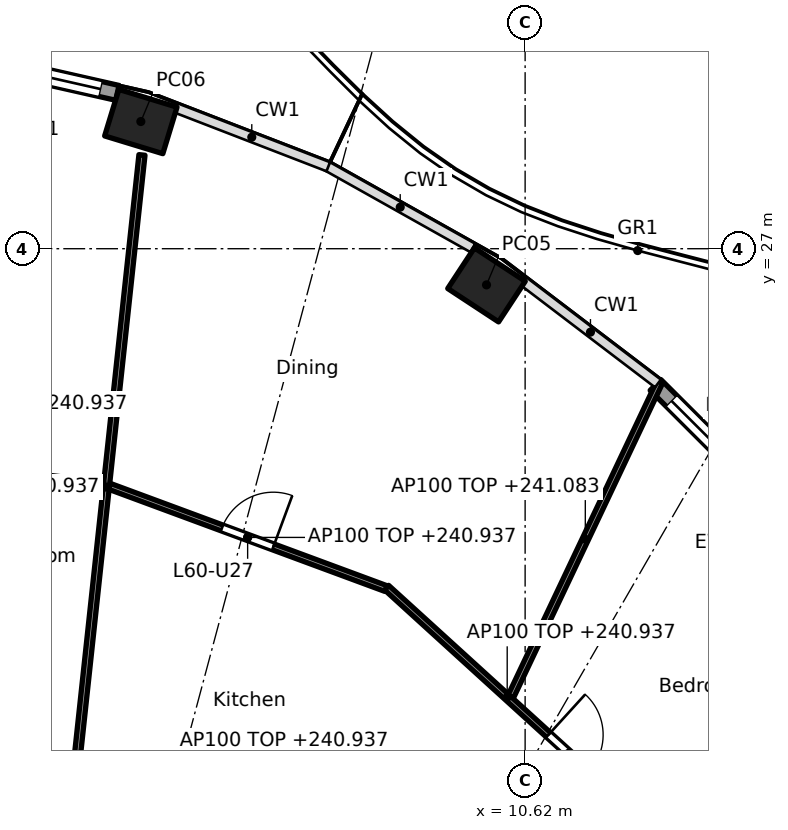
"""IFC4 building model, lengths in metres.
Left out: names, types, materials, properties, quantities, classifications, styles, units other than length and angle.
Written with IfcOpenShell. Run it as: python <this file> out.ifc"""

import sys

from ifc_helpers import new_model, si_unit, direction, frame, frame_2d, origin, origin_2d, place, context, subcontext, project, spatial, rectangle, hollow_rectangle, extrude, element, fill, save


model = new_model("IFC4")
c1 = context("Model", 3, precision=1e-05, world=origin(), true_north=direction((0.0, 1.0)))
c2 = subcontext(c1, "Body", "Model", "MODEL_VIEW")
j1 = project(units=[si_unit("LENGTHUNIT", "METRE"), si_unit("PLANEANGLEUNIT", "RADIAN")], contexts=[c1])
p1 = place(None, origin())
s1 = spatial("IfcSite", under=j1, at=p1, CompositionType="ELEMENT")
p2 = place(p1, origin())
s2 = spatial("IfcBuilding", under=s1, at=p2, CompositionType="ELEMENT")
p3 = place(p2, frame((0.0, 0.0, 238.1)))
s3 = spatial("IfcBuildingStorey", under=s2, at=p3, CompositionType="ELEMENT", Elevation=238.1)
for number, where, z_axis, x_axis in (
    (1, (9.985, 26.405, 0.0), (0.0, 0.0, 1.0), (-0.836, 0.549, 0.0)),
    (2, (4.3, 29.092, 0.0), (0.0, 0.0, 1.0), (-0.957, 0.292, 0.0)),
):
    element("IfcColumn", number, at=place(p3, frame(where, z_axis=z_axis, x_axis=x_axis)), inside=s3, PredefinedType="COLUMN", context=c2, shape_type="SweptSolid", body=[
        extrude(hollow_rectangle(XDim=1.0, YDim=0.8, WallThickness=0.032, at=origin_2d()), origin(), (0.0, 0.0, 1.0), 3.7),
    ])
p4 = place(p3, frame((12.765, 24.759, 0.0), z_axis=(0.0, 0.0, 1.0), x_axis=(0.707793125551, -0.706419769983, 0.0)))
e3 = element("IfcWall", 3, at=p4, inside=s3, PredefinedType="SOLIDWALL", context=c2, shape_type="SweptSolid", body=[
    extrude(rectangle(XDim=2.844, YDim=0.25, at=frame_2d((1.422, 0.0))), origin(), (0.0, 0.0, 1.0), 3.44),
])
p5 = place(p4, frame((0.372, 0.0, 0.0)))
e4 = element("IfcOpeningElement", 4, at=p5, cuts=e3, PredefinedType="OPENING", context=c2, shape_type="SweptSolid", body=[
    extrude(rectangle(XDim=2.1, YDim=2.4, at=frame_2d((1.05, 1.2))), frame((0.0, 0.135, 0.0), z_axis=(0.0, -1.0, 0.0), x_axis=(1.0, 0.0, 0.0)), (0.0, 0.0, 1.0), 0.27),
])
p6 = place(p3, frame((1.314, 30.151, 0.0), z_axis=(0.0, 0.0, 1.0), x_axis=(0.975324089124, -0.220777990694, 0.0)))
e5 = element("IfcWall", 5, at=p6, inside=s3, PredefinedType="SOLIDWALL", context=c2, shape_type="SweptSolid", body=[
    extrude(rectangle(XDim=2.666, YDim=0.25, at=frame_2d((1.333, 0.0))), origin(), (0.0, 0.0, 1.0), 3.44),
])
p7 = place(p6, frame((0.283, 0.0, 0.0)))
e6 = element("IfcOpeningElement", 6, at=p7, cuts=e5, PredefinedType="OPENING", context=c2, shape_type="SweptSolid", body=[
    extrude(rectangle(XDim=2.1, YDim=2.4, at=frame_2d((1.05, 1.2))), frame((0.0, 0.135, 0.0), z_axis=(0.0, -1.0, 0.0), x_axis=(1.0, 0.0, 0.0)), (0.0, 0.0, 1.0), 0.27),
])
p8 = place(p3, frame((12.31, 17.817, 0.0), z_axis=(0.0, 0.0, 1.0), x_axis=(-0.739697052892, 0.672940019573, 0.0)))
e7 = element("IfcWall", 7, at=p8, inside=s3, PredefinedType="PARTITIONING", context=c2, shape_type="SweptSolid", body=[
    extrude(rectangle(XDim=5.365, YDim=0.1, at=frame_2d((2.683, 0.0))), origin(), (0.0, 0.0, 1.0), 2.837),
])
p9 = place(p8, frame((0.866, 0.0, 0.0)))
e8 = element("IfcOpeningElement", 8, at=p9, cuts=e7, PredefinedType="OPENING", context=c2, shape_type="SweptSolid", body=[
    extrude(rectangle(XDim=0.9, YDim=2.1, at=frame_2d((0.45, 1.05))), frame((0.0, 0.06, 0.0), z_axis=(0.0, -1.0, 0.0), x_axis=(1.0, 0.0, 0.0)), (0.0, 0.0, 1.0), 0.12),
])
p10 = place(p3, frame((10.384, 19.634, 0.0), z_axis=(0.0, 0.0, 1.0), x_axis=(0.428003913038, 0.903776880886, 0.0)))
e9 = element("IfcWall", 9, at=p10, inside=s3, PredefinedType="PARTITIONING", context=c2, shape_type="SweptSolid", body=[
    extrude(rectangle(XDim=5.729, YDim=0.1, at=frame_2d((2.865, 0.0))), origin(), (0.0, 0.0, 1.0), 2.983),
])
p11 = place(p3, frame((8.331, 21.411, 0.0), z_axis=(0.0, 0.0, 1.0), x_axis=(-0.937891982431, 0.346927412136, 0.0)))
e10 = element("IfcWall", 10, at=p11, inside=s3, PredefinedType="PARTITIONING", context=c2, shape_type="SweptSolid", body=[
    extrude(rectangle(XDim=4.85, YDim=0.1, at=frame_2d((2.425, 0.0))), origin(), (0.0, 0.0, 1.0), 2.837),
])
p12 = place(p11, frame((1.975, 0.0, 0.0)))
e11 = element("IfcOpeningElement", 11, at=p12, cuts=e10, PredefinedType="OPENING", context=c2, shape_type="SweptSolid", body=[
    extrude(rectangle(XDim=0.9, YDim=2.1, at=frame_2d((0.45, 1.05))), frame((0.0, 0.06, 0.0), z_axis=(0.0, -1.0, 0.0), x_axis=(1.0, 0.0, 0.0)), (0.0, 0.0, 1.0), 0.12),
])
p13 = place(p3, frame((3.145, 17.618, 0.0), z_axis=(0.0, 0.0, 1.0), x_axis=(0.106818720076, 0.994278512813, 0.0)))
e12 = element("IfcWall", 12, at=p13, inside=s3, PredefinedType="PARTITIONING", context=c2, shape_type="SweptSolid", body=[
    extrude(rectangle(XDim=10.987, YDim=0.1, at=frame_2d((5.493, 0.0))), origin(), (0.0, 0.0, 1.0), 2.837),
])
p14 = place(p3, frame((3.686, 23.117, 0.0), z_axis=(0.0, 0.0, 1.0), x_axis=(-0.992965872314, 0.11840091393, 0.0)))
e13 = element("IfcWall", 13, at=p14, inside=s3, PredefinedType="PARTITIONING", context=c2, shape_type="SweptSolid", body=[
    extrude(rectangle(XDim=4.786, YDim=0.1, at=frame_2d((2.393, 0.0))), origin(), (0.0, 0.0, 1.0), 2.837),
])
p15 = place(p5, origin())
e14 = element("IfcDoor", 14, at=p15, inside=s3, OperationType="SLIDING_TO_LEFT", PredefinedType="DOOR", context=c2, shape_type="SweptSolid", body=[
    extrude(rectangle(XDim=2.1, YDim=2.4, at=frame_2d((1.05, 1.2))), frame((0.0, 0.025, 0.0), z_axis=(0.0, -1.0, 0.0), x_axis=(1.0, 0.0, 0.0)), (0.0, 0.0, 1.0), 0.05),
])
fill(e4, e14)
p16 = place(p7, origin())
e15 = element("IfcDoor", 15, at=p16, inside=s3, OperationType="SLIDING_TO_LEFT", PredefinedType="DOOR", context=c2, shape_type="SweptSolid", body=[
    extrude(rectangle(XDim=2.1, YDim=2.4, at=frame_2d((1.05, 1.2))), frame((0.0, 0.025, 0.0), z_axis=(0.0, -1.0, 0.0), x_axis=(1.0, 0.0, 0.0)), (0.0, 0.0, 1.0), 0.05),
])
fill(e6, e15)
p17 = place(p9, frame((0.9, 0.0, 0.0), x_axis=(-1.0, 0.0, 0.0)))
e16 = element("IfcDoor", 16, at=p17, inside=s3, OperationType="SINGLE_SWING_LEFT", PredefinedType="DOOR", context=c2, shape_type="SweptSolid", body=[
    extrude(rectangle(XDim=0.9, YDim=2.1, at=frame_2d((0.45, 1.05))), frame((0.0, 0.025, 0.0), z_axis=(0.0, -1.0, 0.0), x_axis=(1.0, 0.0, 0.0)), (0.0, 0.0, 1.0), 0.05),
])
fill(e8, e16)
p18 = place(p12, frame((0.9, 0.0, 0.0), x_axis=(-1.0, 0.0, 0.0)))
e17 = element("IfcDoor", 17, at=p18, inside=s3, OperationType="SINGLE_SWING_RIGHT", PredefinedType="DOOR", context=c2, shape_type="SweptSolid", body=[
    extrude(rectangle(XDim=0.9, YDim=2.1, at=frame_2d((0.45, 1.05))), frame((0.0, 0.025, 0.0), z_axis=(0.0, -1.0, 0.0), x_axis=(1.0, 0.0, 0.0)), (0.0, 0.0, 1.0), 0.05),
])
fill(e11, e17)
save(model, sys.argv[1])
